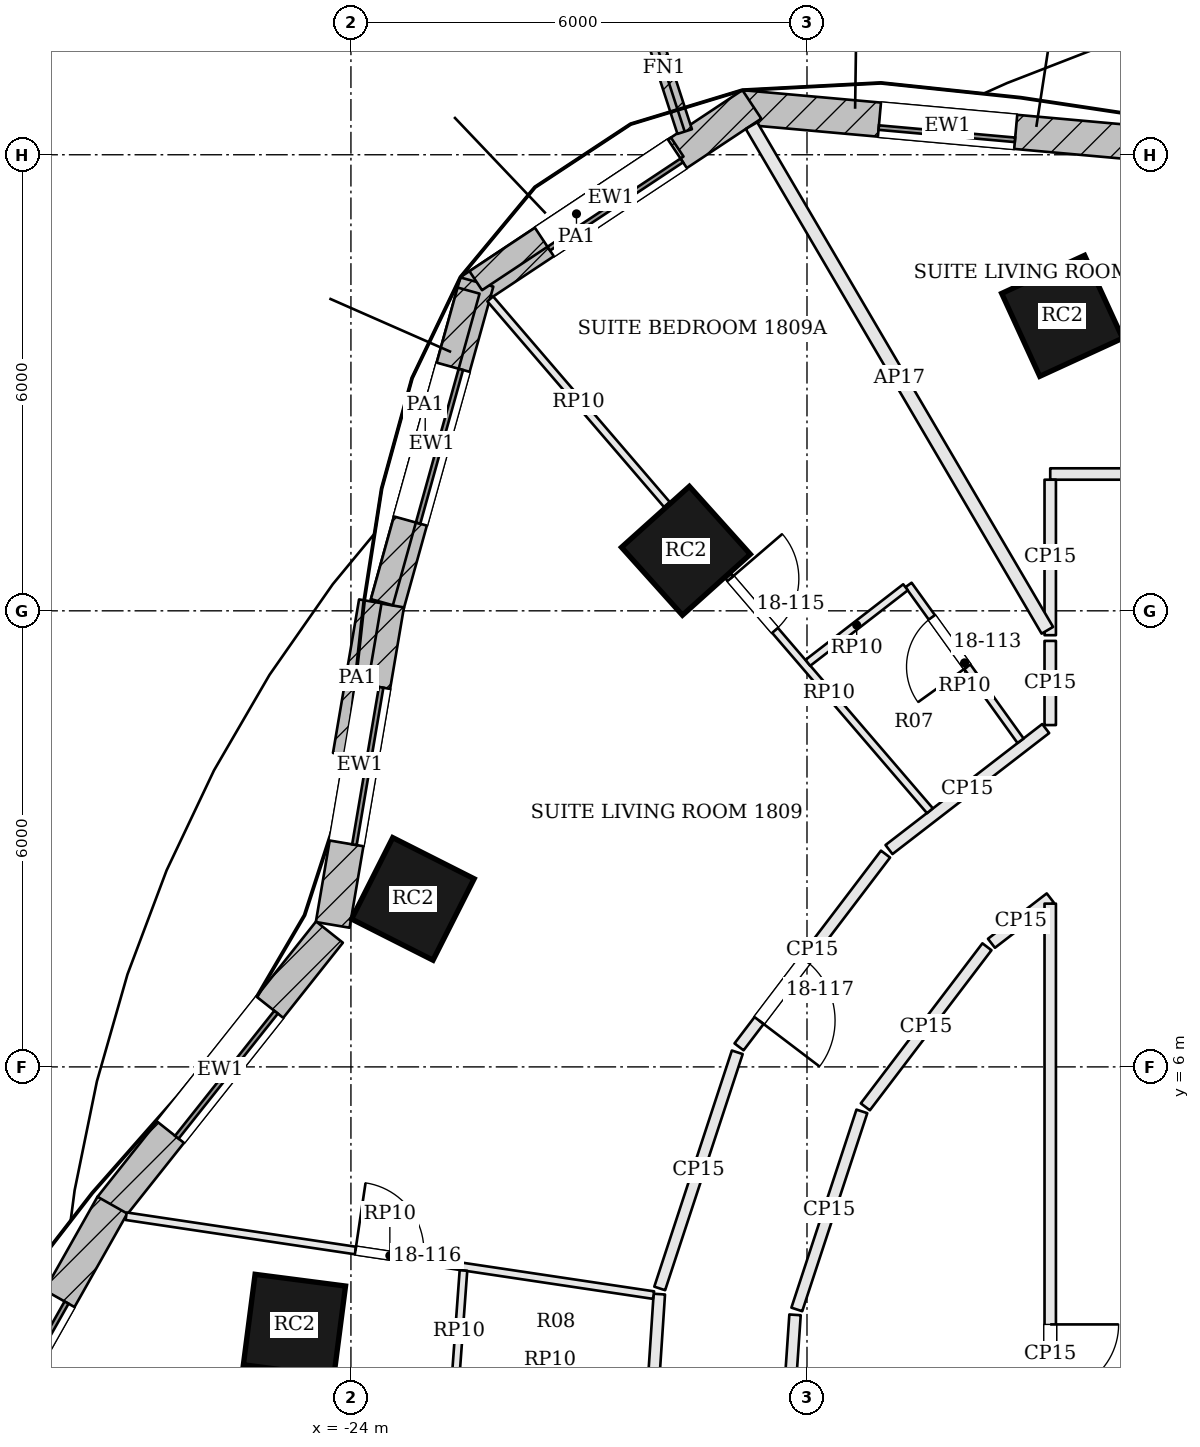
"""IFC4 building model, lengths in metres.
Left out: names, types, materials, properties, quantities, classifications, styles, units other than length and angle.
Written with IfcOpenShell. Run it as: python <this file> out.ifc"""

import sys

from ifc_helpers import new_model, si_unit, direction, frame, frame_2d, origin, origin_2d, place, context, subcontext, project, spatial, rectangle, extrude, element, fill, save


model = new_model("IFC4")
c1 = context("Model", 3, precision=1e-05, world=origin(), true_north=direction((0.0, 1.0)))
c2 = subcontext(c1, "Body", "Model", "MODEL_VIEW")
j1 = project(units=[si_unit("LENGTHUNIT", "METRE"), si_unit("PLANEANGLEUNIT", "RADIAN")], contexts=[c1])
p1 = place(None, origin())
s1 = spatial("IfcSite", under=j1, at=p1, CompositionType="ELEMENT")
p2 = place(p1, origin())
s2 = spatial("IfcBuilding", under=s1, at=p2, CompositionType="ELEMENT")
p3 = place(p2, frame((0.0, 0.0, 81.6)))
s3 = spatial("IfcBuildingStorey", under=s2, at=p3, CompositionType="ELEMENT", Elevation=81.6)
for number, where, z_axis, x_axis in (
    (1, (-14.643, 15.881, -0.7), (0.0, 0.0, 1.0), (-0.909, -0.417, 0.0)),
    (2, (-19.593, 12.79, -0.7), (0.0, 0.0, 1.0), (-0.744, -0.668, 0.0)),
    (3, (-23.185, 8.21, -0.7), (0.0, 0.0, 1.0), (-0.451, -0.893, 0.0)),
    (4, (-24.743, 2.599, -0.7), (0.0, 0.0, 1.0), (-0.128, -0.992, 0.0)),
):
    element("IfcColumn", number, at=place(p3, frame(where, z_axis=z_axis, x_axis=x_axis)), inside=s3, PredefinedType="COLUMN", context=c2, shape_type="SweptSolid", body=[
        extrude(rectangle(XDim=1.2, YDim=1.2, at=origin_2d()), origin(), (0.0, 0.0, 1.0), 4.3),
    ])
p4 = place(p3, frame((-13.436, 18.138, 0.0), z_axis=(0.0, 0.0, 1.0), x_axis=(-0.99598810213, 0.089485755376, 0.0)))
e5 = element("IfcWall", 5, at=p4, inside=s3, PredefinedType="SOLIDWALL", context=c2, shape_type="SweptSolid", body=[
    extrude(rectangle(XDim=5.451, YDim=0.45, at=frame_2d((2.726, 0.0))), origin(), (0.0, 0.0, 1.0), 3.4),
])
p5 = place(p4, frame((1.825, 0.0, 0.9)))
e6 = element("IfcOpeningElement", 6, at=p5, cuts=e5, PredefinedType="OPENING", context=c2, shape_type="SweptSolid", body=[
    extrude(rectangle(XDim=1.8, YDim=2.0, at=frame_2d((0.9, 1.0))), frame((0.0, 0.235, 0.0), z_axis=(0.0, -1.0, 0.0), x_axis=(1.0, 0.0, 0.0)), (0.0, 0.0, 1.0), 0.47),
])
p6 = place(p3, frame((-18.726, 18.663, 0.0), z_axis=(0.0, 0.0, 1.0), x_axis=(-0.83333921474, -0.552761931736, 0.0)))
e7 = element("IfcWall", 7, at=p6, inside=s3, PredefinedType="SOLIDWALL", context=c2, shape_type="SweptSolid", body=[
    extrude(rectangle(XDim=4.451, YDim=0.45, at=frame_2d((2.225, 0.0))), origin(), (0.0, 0.0, 1.0), 3.4),
])
p7 = place(p6, frame((1.175, 0.0, 0.9)))
e8 = element("IfcOpeningElement", 8, at=p7, cuts=e7, PredefinedType="OPENING", context=c2, shape_type="SweptSolid", body=[
    extrude(rectangle(XDim=2.1, YDim=2.0, at=frame_2d((1.05, 1.0))), frame((0.0, 0.235, 0.0), z_axis=(0.0, -1.0, 0.0), x_axis=(1.0, 0.0, 0.0)), (0.0, 0.0, 1.0), 0.47),
])
p8 = place(p3, frame((-22.344, 16.326, 0.0), z_axis=(0.0, 0.0, 1.0), x_axis=(-0.267925456304, -0.963439645159, 0.0)))
e9 = element("IfcWall", 9, at=p8, inside=s3, PredefinedType="SOLIDWALL", context=c2, shape_type="SweptSolid", body=[
    extrude(rectangle(XDim=4.427, YDim=0.45, at=frame_2d((2.213, 0.0))), origin(), (0.0, 0.0, 1.0), 3.4),
])
p9 = place(p8, frame((1.164, 0.0, 0.9)))
e10 = element("IfcOpeningElement", 10, at=p9, cuts=e9, PredefinedType="OPENING", context=c2, shape_type="SweptSolid", body=[
    extrude(rectangle(XDim=2.1, YDim=2.0, at=frame_2d((1.05, 1.0))), frame((0.0, 0.235, 0.0), z_axis=(0.0, -1.0, 0.0), x_axis=(1.0, 0.0, 0.0)), (0.0, 0.0, 1.0), 0.47),
])
p10 = place(p3, frame((-23.524, 12.083, 0.0), z_axis=(0.0, 0.0, 1.0), x_axis=(-0.167445072349, -0.985881406532, 0.0)))
e11 = element("IfcWall", 11, at=p10, inside=s3, PredefinedType="SOLIDWALL", context=c2, shape_type="SweptSolid", body=[
    extrude(rectangle(XDim=4.275, YDim=0.45, at=frame_2d((2.137, 0.0))), origin(), (0.0, 0.0, 1.0), 3.4),
])
p11 = place(p10, frame((1.087, 0.0, 0.9)))
e12 = element("IfcOpeningElement", 12, at=p11, cuts=e11, PredefinedType="OPENING", context=c2, shape_type="SweptSolid", body=[
    extrude(rectangle(XDim=2.1, YDim=2.0, at=frame_2d((1.05, 1.0))), frame((0.0, 0.235, 0.0), z_axis=(0.0, -1.0, 0.0), x_axis=(1.0, 0.0, 0.0)), (0.0, 0.0, 1.0), 0.47),
])
p12 = place(p3, frame((-24.282, 7.774, 0.0), z_axis=(0.0, 0.0, 1.0), x_axis=(-0.621735490397, -0.783227285008, 0.0)))
e13 = element("IfcWall", 13, at=p12, inside=s3, PredefinedType="SOLIDWALL", context=c2, shape_type="SweptSolid", body=[
    extrude(rectangle(XDim=4.625, YDim=0.45, at=frame_2d((2.312, 0.0))), origin(), (0.0, 0.0, 1.0), 3.4),
])
p13 = place(p12, frame((1.262, 0.0, 0.9)))
e14 = element("IfcOpeningElement", 14, at=p13, cuts=e13, PredefinedType="OPENING", context=c2, shape_type="SweptSolid", body=[
    extrude(rectangle(XDim=2.1, YDim=2.0, at=frame_2d((1.05, 1.0))), frame((0.0, 0.235, 0.0), z_axis=(0.0, -1.0, 0.0), x_axis=(1.0, 0.0, 0.0)), (0.0, 0.0, 1.0), 0.47),
])
p14 = place(p3, frame((-27.138, 4.181, 0.0), z_axis=(0.0, 0.0, 1.0), x_axis=(-0.491588303761, -0.870827732451, 0.0)))
e15 = element("IfcWall", 15, at=p14, inside=s3, PredefinedType="SOLIDWALL", context=c2, shape_type="SweptSolid", body=[
    extrude(rectangle(XDim=4.924, YDim=0.45, at=frame_2d((2.462, 0.0))), origin(), (0.0, 0.0, 1.0), 3.4),
])
p15 = place(p14, frame((1.412, 0.0, 0.9)))
e16 = element("IfcOpeningElement", 16, at=p15, cuts=e15, PredefinedType="OPENING", context=c2, shape_type="SweptSolid", body=[
    extrude(rectangle(XDim=2.1, YDim=2.0, at=frame_2d((1.05, 1.0))), frame((0.0, 0.235, 0.0), z_axis=(0.0, -1.0, 0.0), x_axis=(1.0, 0.0, 0.0)), (0.0, 0.0, 1.0), 0.47),
])
p16 = place(p3, frame((-19.609, 18.305, 0.0), z_axis=(0.0, 0.0, 1.0), x_axis=(-0.308600224758, 0.951191832008, 0.0)))
e17 = element("IfcWall", 17, at=p16, inside=s3, PredefinedType="SOLIDWALL", context=c2, shape_type="SweptSolid", body=[
    extrude(rectangle(XDim=1.75, YDim=0.2, at=frame_2d((0.875, 0.0))), origin(), (0.0, 0.0, 1.0), 3.4),
])
p17 = place(p3, frame((-19.708, 18.101, 3.6), z_axis=(0.0, 0.0, 1.0), x_axis=(-0.833370664286, -0.552714515738, 0.0)))
e18 = element("IfcWall", 18, at=p17, inside=s3, PredefinedType="PARAPET", context=c2, shape_type="SweptSolid", body=[
    extrude(rectangle(XDim=3.18, YDim=0.3, at=frame_2d((1.59, 0.0))), origin(), (0.0, 0.0, 1.0), 1.1),
])
p18 = place(p3, frame((-22.452, 16.213, 3.6), z_axis=(0.0, 0.0, 1.0), x_axis=(-0.267993020858, -0.963420853403, 0.0)))
e19 = element("IfcWall", 19, at=p18, inside=s3, PredefinedType="PARAPET", context=c2, shape_type="SweptSolid", body=[
    extrude(rectangle(XDim=4.255, YDim=0.3, at=frame_2d((2.128, 0.0))), origin(), (0.0, 0.0, 1.0), 1.1),
])
p19 = place(p3, frame((-23.745, 12.125, 3.6), z_axis=(0.0, 0.0, 1.0), x_axis=(-0.16743218322, -0.985883595574, 0.0)))
e20 = element("IfcWall", 20, at=p19, inside=s3, PredefinedType="PARAPET", context=c2, shape_type="SweptSolid", body=[
    extrude(rectangle(XDim=2.049, YDim=0.3, at=frame_2d((1.024, 0.0))), origin(), (0.0, 0.0, 1.0), 1.1),
])
p20 = place(p3, frame((-3.078, 13.8, 0.0), z_axis=(0.0, 0.0, 1.0), x_axis=(-1.0, 0.0, 0.0)))
e21 = element("IfcWall", 21, at=p20, inside=s3, PredefinedType="PARTITIONING", context=c2, shape_type="SweptSolid", body=[
    extrude(rectangle(XDim=11.722, YDim=0.15, at=frame_2d((5.861, 0.0))), origin(), (0.0, 0.0, 1.0), 2.784),
])
p21 = place(p20, frame((7.719, 0.0, 0.0)))
e22 = element("IfcOpeningElement", 22, at=p21, cuts=e21, PredefinedType="OPENING", context=c2, shape_type="SweptSolid", body=[
    extrude(rectangle(XDim=1.0, YDim=2.1, at=frame_2d((0.5, 1.05))), frame((0.0, 0.085, 0.0), z_axis=(0.0, -1.0, 0.0), x_axis=(1.0, 0.0, 0.0)), (0.0, 0.0, 1.0), 0.17),
])
p22 = place(p3, frame((-14.8, 13.725, 0.0), z_axis=(0.0, 0.0, 1.0), x_axis=(0.0, -1.0, 0.0)))
e23 = element("IfcWall", 23, at=p22, inside=s3, PredefinedType="PARTITIONING", context=c2, shape_type="SweptSolid", body=[
    extrude(rectangle(XDim=2.046, YDim=0.15, at=frame_2d((1.023, 0.0))), origin(), (0.0, 0.0, 1.0), 2.784),
])
p23 = place(p3, frame((-18.73, 18.384, 0.0), z_axis=(0.0, 0.0, 1.0), x_axis=(0.505731710935, -0.862690811679, 0.0)))
e24 = element("IfcWall", 24, at=p23, inside=s3, PredefinedType="PARTITIONING", context=c2, shape_type="SweptSolid", body=[
    extrude(rectangle(XDim=7.697, YDim=0.175, at=frame_2d((3.848, 0.0))), origin(), (0.0, 0.0, 1.0), 2.784),
])
p24 = place(p3, frame((-14.8, 11.604, 0.0), z_axis=(0.0, 0.0, 1.0), x_axis=(0.0, -1.0, 0.0)))
e25 = element("IfcWall", 25, at=p24, inside=s3, PredefinedType="PARTITIONING", context=c2, shape_type="SweptSolid", body=[
    extrude(rectangle(XDim=1.107, YDim=0.15, at=frame_2d((0.554, 0.0))), origin(), (0.0, 0.0, 1.0), 2.784),
])
p25 = place(p3, frame((-14.86, 10.451, 0.0), z_axis=(0.0, 0.0, 1.0), x_axis=(-0.791542595332, -0.611113999001, 0.0)))
e26 = element("IfcWall", 26, at=p25, inside=s3, PredefinedType="PARTITIONING", context=c2, shape_type="SweptSolid", body=[
    extrude(rectangle(XDim=2.605, YDim=0.15, at=frame_2d((1.302, 0.0))), origin(), (0.0, 0.0, 1.0), 2.784),
])
p26 = place(p3, frame((-16.967, 8.8, 0.0), z_axis=(0.0, 0.0, 1.0), x_axis=(-0.604991921991, -0.796231608469, 0.0)))
e27 = element("IfcWall", 27, at=p26, inside=s3, PredefinedType="PARTITIONING", context=c2, shape_type="SweptSolid", body=[
    extrude(rectangle(XDim=3.185, YDim=0.15, at=frame_2d((1.593, 0.0))), origin(), (0.0, 0.0, 1.0), 2.784),
])
p27 = place(p26, frame((1.75, 0.0, 0.0)))
e28 = element("IfcOpeningElement", 28, at=p27, cuts=e27, PredefinedType="OPENING", context=c2, shape_type="SweptSolid", body=[
    extrude(rectangle(XDim=1.0, YDim=2.1, at=frame_2d((0.5, 1.05))), frame((0.0, 0.085, 0.0), z_axis=(0.0, -1.0, 0.0), x_axis=(1.0, 0.0, 0.0)), (0.0, 0.0, 1.0), 0.17),
])
p28 = place(p3, frame((-18.917, 6.192, 0.0), z_axis=(0.0, 0.0, 1.0), x_axis=(-0.31208108916, -0.950055468796, 0.0)))
e29 = element("IfcWall", 29, at=p28, inside=s3, PredefinedType="PARTITIONING", context=c2, shape_type="SweptSolid", body=[
    extrude(rectangle(XDim=3.27, YDim=0.15, at=frame_2d((1.635, 0.0))), origin(), (0.0, 0.0, 1.0), 2.784),
])
p29 = place(p3, frame((-19.943, 3.011, 0.0), z_axis=(0.0, 0.0, 1.0), x_axis=(-0.066159683944, -0.997809047975, 0.0)))
e30 = element("IfcWall", 30, at=p29, inside=s3, PredefinedType="PARTITIONING", context=c2, shape_type="SweptSolid", body=[
    extrude(rectangle(XDim=3.067, YDim=0.15, at=frame_2d((1.533, 0.0))), origin(), (0.0, 0.0, 1.0), 2.784),
])
p30 = place(p3, frame((-18.34, 0.075, 0.0), z_axis=(0.0, 0.0, 1.0), x_axis=(0.068321828968, 0.997663333839, 0.0)))
e31 = element("IfcWall", 31, at=p30, inside=s3, PredefinedType="PARTITIONING", context=c2, shape_type="SweptSolid", body=[
    extrude(rectangle(XDim=2.669, YDim=0.15, at=frame_2d((1.335, 0.0))), origin(), (0.0, 0.0, 1.0), 2.784),
])
p31 = place(p3, frame((-18.134, 2.809, 0.0), z_axis=(0.0, 0.0, 1.0), x_axis=(0.312005223814, 0.950080386237, 0.0)))
e32 = element("IfcWall", 32, at=p31, inside=s3, PredefinedType="PARTITIONING", context=c2, shape_type="SweptSolid", body=[
    extrude(rectangle(XDim=2.743, YDim=0.15, at=frame_2d((1.371, 0.0))), origin(), (0.0, 0.0, 1.0), 2.784),
])
p32 = place(p3, frame((-17.233, 5.475, 0.0), z_axis=(0.0, 0.0, 1.0), x_axis=(0.605024750549, 0.796206663639, 0.0)))
e33 = element("IfcWall", 33, at=p32, inside=s3, PredefinedType="PARTITIONING", context=c2, shape_type="SweptSolid", body=[
    extrude(rectangle(XDim=2.645, YDim=0.15, at=frame_2d((1.322, 0.0))), origin(), (0.0, 0.0, 1.0), 2.784),
])
p33 = place(p3, frame((-15.573, 7.626, 0.0), z_axis=(0.0, 0.0, 1.0), x_axis=(0.791581834002, 0.611063171921, 0.0)))
e34 = element("IfcWall", 34, at=p33, inside=s3, PredefinedType="PARTITIONING", context=c2, shape_type="SweptSolid", body=[
    extrude(rectangle(XDim=0.977, YDim=0.15, at=frame_2d((0.488, 0.0))), origin(), (0.0, 0.0, 1.0), 2.784),
])
p34 = place(p3, frame((-14.8, 8.148, 0.0), z_axis=(0.0, 0.0, 1.0), x_axis=(0.0, -1.0, 0.0)))
e35 = element("IfcWall", 35, at=p34, inside=s3, PredefinedType="PARTITIONING", context=c2, shape_type="SweptSolid", body=[
    extrude(rectangle(XDim=12.948, YDim=0.15, at=frame_2d((6.474, 0.0))), origin(), (0.0, 0.0, 1.0), 2.784),
])
p35 = place(p34, frame((5.536, 0.0, 0.0)))
e36 = element("IfcOpeningElement", 36, at=p35, cuts=e35, PredefinedType="OPENING", context=c2, shape_type="SweptSolid", body=[
    extrude(rectangle(XDim=1.8, YDim=2.1, at=frame_2d((0.9, 1.05))), frame((0.0, 0.085, 0.0), z_axis=(0.0, -1.0, 0.0), x_axis=(1.0, 0.0, 0.0)), (0.0, 0.0, 1.0), 0.17),
])
p36 = place(p3, frame((-22.167, 16.104, 0.0), z_axis=(0.0, 0.0, 1.0), x_axis=(0.651585854712, -0.758574896724, 0.0)))
e37 = element("IfcWall", 37, at=p36, inside=s3, PredefinedType="PARTITIONING", context=c2, shape_type="SweptSolid", body=[
    extrude(rectangle(XDim=3.567, YDim=0.1, at=frame_2d((1.783, 0.0))), origin(), (0.0, 0.0, 1.0), 2.784),
])
p37 = place(p3, frame((-19.035, 12.458, 0.0), z_axis=(0.0, 0.0, 1.0), x_axis=(0.651615806177, -0.758549168571, 0.0)))
e38 = element("IfcWall", 38, at=p37, inside=s3, PredefinedType="PARTITIONING", context=c2, shape_type="SweptSolid", body=[
    extrude(rectangle(XDim=4.071, YDim=0.1, at=frame_2d((2.035, 0.0))), origin(), (0.0, 0.0, 1.0), 2.784),
])
p38 = place(p37, frame((0.043, 0.0, 0.0)))
e39 = element("IfcOpeningElement", 39, at=p38, cuts=e38, PredefinedType="OPENING", context=c2, shape_type="SweptSolid", body=[
    extrude(rectangle(XDim=0.9, YDim=2.4, at=frame_2d((0.45, 1.2))), frame((0.0, 0.06, 0.0), z_axis=(0.0, -1.0, 0.0), x_axis=(1.0, 0.0, 0.0)), (0.0, 0.0, 1.0), 0.12),
])
p39 = place(p3, frame((-26.957, 4.036, 0.0), z_axis=(0.0, 0.0, 1.0), x_axis=(0.98899243715, -0.147966074693, 0.0)))
e40 = element("IfcWall", 40, at=p39, inside=s3, PredefinedType="PARTITIONING", context=c2, shape_type="SweptSolid", body=[
    extrude(rectangle(XDim=7.016, YDim=0.1, at=frame_2d((3.508, 0.0))), origin(), (0.0, 0.0, 1.0), 2.784),
])
p40 = place(p39, frame((3.05, 0.0, 0.0)))
e41 = element("IfcOpeningElement", 41, at=p40, cuts=e40, PredefinedType="OPENING", context=c2, shape_type="SweptSolid", body=[
    extrude(rectangle(XDim=0.9, YDim=2.4, at=frame_2d((0.45, 1.2))), frame((0.0, 0.06, 0.0), z_axis=(0.0, -1.0, 0.0), x_axis=(1.0, 0.0, 0.0)), (0.0, 0.0, 1.0), 0.12),
])
p41 = place(p3, frame((-15.19, 10.291, 0.0), z_axis=(0.0, 0.0, 1.0), x_axis=(-0.583805380482, 0.81189363695, 0.0)))
e42 = element("IfcWall", 42, at=p41, inside=s3, PredefinedType="PARTITIONING", context=c2, shape_type="SweptSolid", body=[
    extrude(rectangle(XDim=2.525, YDim=0.1, at=frame_2d((1.262, 0.0))), origin(), (0.0, 0.0, 1.0), 2.784),
])
p42 = place(p41, frame((1.2, 0.0, 0.0)))
e43 = element("IfcOpeningElement", 43, at=p42, cuts=e42, PredefinedType="OPENING", context=c2, shape_type="SweptSolid", body=[
    extrude(rectangle(XDim=0.8, YDim=2.1, at=frame_2d((0.4, 1.05))), frame((0.0, 0.06, 0.0), z_axis=(0.0, -1.0, 0.0), x_axis=(1.0, 0.0, 0.0)), (0.0, 0.0, 1.0), 0.12),
])
p43 = place(p3, frame((-16.704, 12.31, 0.0), z_axis=(0.0, 0.0, 1.0), x_axis=(-0.790798809465, -0.612076174139, 0.0)))
e44 = element("IfcWall", 44, at=p43, inside=s3, PredefinedType="PARTITIONING", context=c2, shape_type="SweptSolid", body=[
    extrude(rectangle(XDim=1.624, YDim=0.1, at=frame_2d((0.812, 0.0))), origin(), (0.0, 0.0, 1.0), 2.784),
])
p44 = place(p3, frame((-22.636, 1.734, 0.0), z_axis=(0.0, 0.0, 1.0), x_axis=(0.07315422809, 0.997320639971, 0.0)))
e45 = element("IfcWall", 45, at=p44, inside=s3, PredefinedType="PARTITIONING", context=c2, shape_type="SweptSolid", body=[
    extrude(rectangle(XDim=1.592, YDim=0.1, at=frame_2d((0.796, 0.0))), origin(), (0.0, 0.0, 1.0), 2.784),
])
p45 = place(p5, origin())
e46 = element("IfcWindow", 46, at=p45, inside=s3, PartitioningType="SINGLE_PANEL", PredefinedType="WINDOW", context=c2, shape_type="SweptSolid", body=[
    extrude(rectangle(XDim=1.8, YDim=2.0, at=frame_2d((0.9, 1.0))), frame((0.0, 0.135, 0.0), z_axis=(0.0, -1.0, 0.0), x_axis=(1.0, 0.0, 0.0)), (0.0, 0.0, 1.0), 0.06),
])
fill(e6, e46)
p46 = place(p7, origin())
e47 = element("IfcWindow", 47, at=p46, inside=s3, PartitioningType="SINGLE_PANEL", PredefinedType="WINDOW", context=c2, shape_type="SweptSolid", body=[
    extrude(rectangle(XDim=2.1, YDim=2.0, at=frame_2d((1.05, 1.0))), frame((0.0, 0.135, 0.0), z_axis=(0.0, -1.0, 0.0), x_axis=(1.0, 0.0, 0.0)), (0.0, 0.0, 1.0), 0.06),
])
fill(e8, e47)
p47 = place(p9, origin())
e48 = element("IfcWindow", 48, at=p47, inside=s3, PartitioningType="SINGLE_PANEL", PredefinedType="WINDOW", context=c2, shape_type="SweptSolid", body=[
    extrude(rectangle(XDim=2.1, YDim=2.0, at=frame_2d((1.05, 1.0))), frame((0.0, 0.135, 0.0), z_axis=(0.0, -1.0, 0.0), x_axis=(1.0, 0.0, 0.0)), (0.0, 0.0, 1.0), 0.06),
])
fill(e10, e48)
p48 = place(p11, origin())
e49 = element("IfcWindow", 49, at=p48, inside=s3, PartitioningType="SINGLE_PANEL", PredefinedType="WINDOW", context=c2, shape_type="SweptSolid", body=[
    extrude(rectangle(XDim=2.1, YDim=2.0, at=frame_2d((1.05, 1.0))), frame((0.0, 0.135, 0.0), z_axis=(0.0, -1.0, 0.0), x_axis=(1.0, 0.0, 0.0)), (0.0, 0.0, 1.0), 0.06),
])
fill(e12, e49)
p49 = place(p13, origin())
e50 = element("IfcWindow", 50, at=p49, inside=s3, PartitioningType="SINGLE_PANEL", PredefinedType="WINDOW", context=c2, shape_type="SweptSolid", body=[
    extrude(rectangle(XDim=2.1, YDim=2.0, at=frame_2d((1.05, 1.0))), frame((0.0, 0.135, 0.0), z_axis=(0.0, -1.0, 0.0), x_axis=(1.0, 0.0, 0.0)), (0.0, 0.0, 1.0), 0.06),
])
fill(e14, e50)
p50 = place(p15, origin())
e51 = element("IfcWindow", 51, at=p50, inside=s3, PartitioningType="SINGLE_PANEL", PredefinedType="WINDOW", context=c2, shape_type="SweptSolid", body=[
    extrude(rectangle(XDim=2.1, YDim=2.0, at=frame_2d((1.05, 1.0))), frame((0.0, 0.135, 0.0), z_axis=(0.0, -1.0, 0.0), x_axis=(1.0, 0.0, 0.0)), (0.0, 0.0, 1.0), 0.06),
])
fill(e16, e51)
p51 = place(p42, origin())
e52 = element("IfcDoor", 52, at=p51, inside=s3, OperationType="SINGLE_SWING_LEFT", PredefinedType="DOOR", context=c2, shape_type="SweptSolid", body=[
    extrude(rectangle(XDim=0.8, YDim=2.1, at=frame_2d((0.4, 1.05))), frame((0.0, 0.025, 0.0), z_axis=(0.0, -1.0, 0.0), x_axis=(1.0, 0.0, 0.0)), (0.0, 0.0, 1.0), 0.05),
])
fill(e43, e52)
p52 = place(p38, origin())
e53 = element("IfcDoor", 53, at=p52, inside=s3, OperationType="SINGLE_SWING_LEFT", PredefinedType="DOOR", context=c2, shape_type="SweptSolid", body=[
    extrude(rectangle(XDim=0.9, YDim=2.4, at=frame_2d((0.45, 1.2))), frame((0.0, 0.025, 0.0), z_axis=(0.0, -1.0, 0.0), x_axis=(1.0, 0.0, 0.0)), (0.0, 0.0, 1.0), 0.05),
])
fill(e39, e53)
p53 = place(p40, origin())
e54 = element("IfcDoor", 54, at=p53, inside=s3, OperationType="SINGLE_SWING_LEFT", PredefinedType="DOOR", context=c2, shape_type="SweptSolid", body=[
    extrude(rectangle(XDim=0.9, YDim=2.4, at=frame_2d((0.45, 1.2))), frame((0.0, 0.025, 0.0), z_axis=(0.0, -1.0, 0.0), x_axis=(1.0, 0.0, 0.0)), (0.0, 0.0, 1.0), 0.05),
])
fill(e41, e54)
p54 = place(p27, origin())
e55 = element("IfcDoor", 55, at=p54, inside=s3, OperationType="SINGLE_SWING_RIGHT", PredefinedType="DOOR", context=c2, shape_type="SweptSolid", body=[
    extrude(rectangle(XDim=1.0, YDim=2.1, at=frame_2d((0.5, 1.05))), frame((0.0, 0.025, 0.0), z_axis=(0.0, -1.0, 0.0), x_axis=(1.0, 0.0, 0.0)), (0.0, 0.0, 1.0), 0.05),
])
fill(e28, e55)
p55 = place(p35, origin())
e56 = element("IfcDoor", 56, at=p55, inside=s3, OperationType="DOUBLE_DOOR_SINGLE_SWING", PredefinedType="DOOR", context=c2, shape_type="SweptSolid", body=[
    extrude(rectangle(XDim=1.8, YDim=2.1, at=frame_2d((0.9, 1.05))), frame((0.0, 0.025, 0.0), z_axis=(0.0, -1.0, 0.0), x_axis=(1.0, 0.0, 0.0)), (0.0, 0.0, 1.0), 0.05),
])
fill(e36, e56)
save(model, sys.argv[1])
